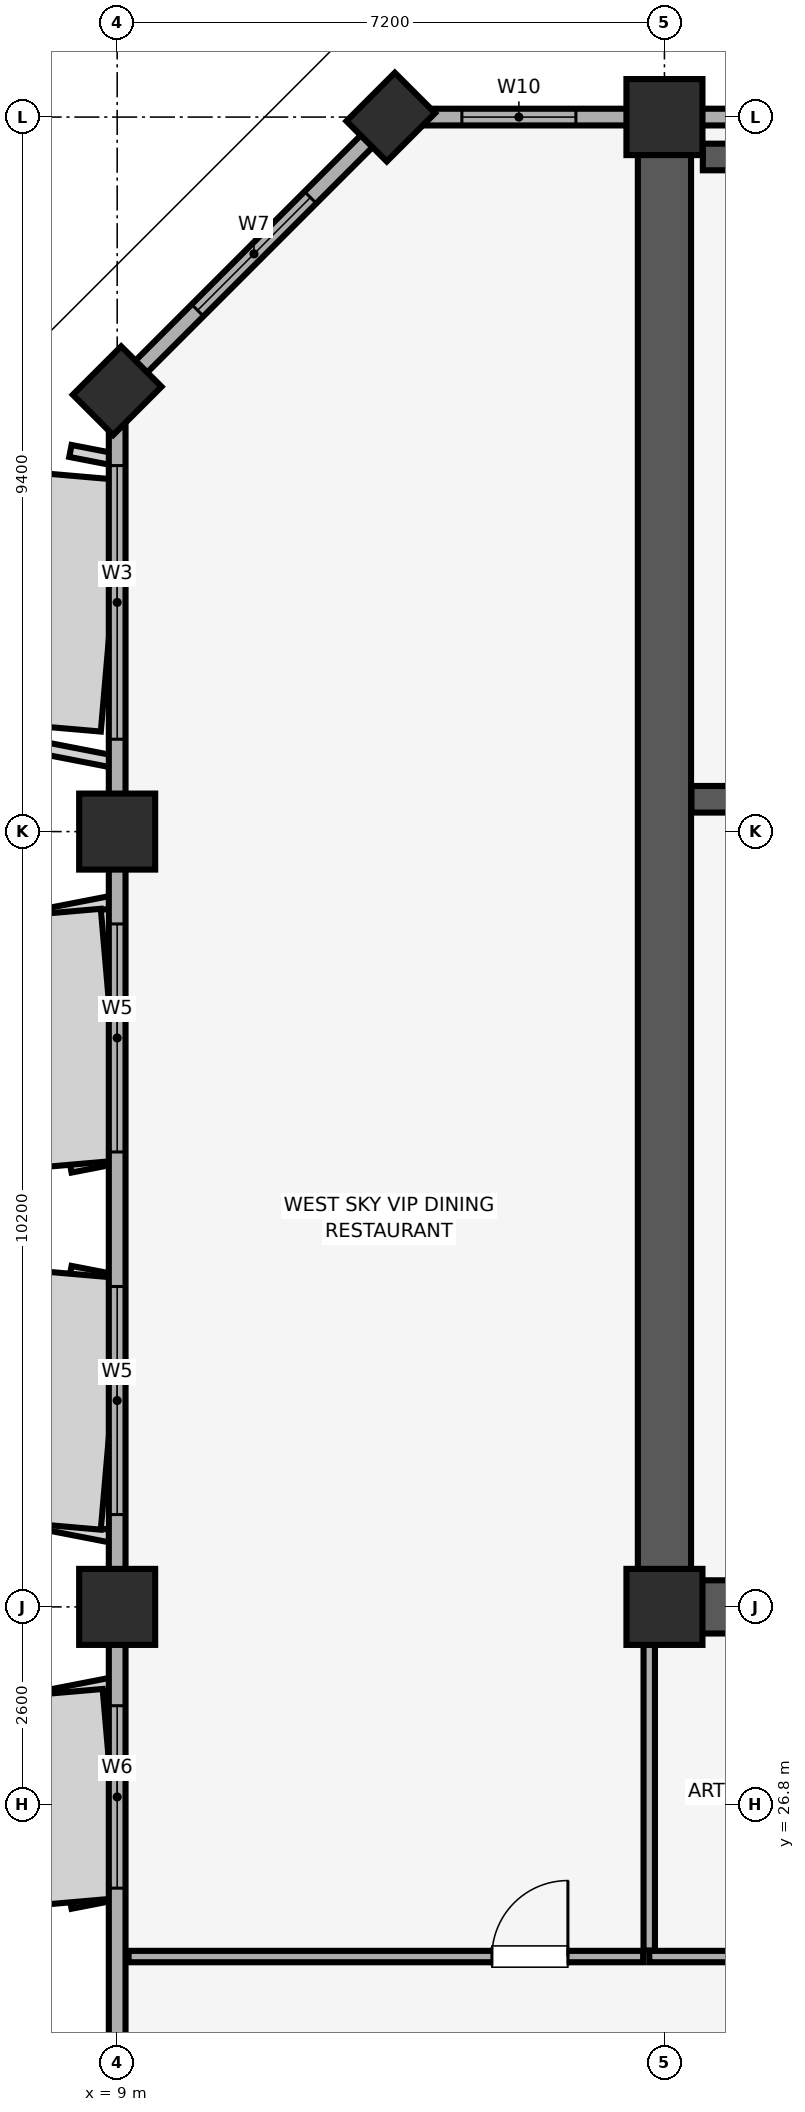
"""IFC4 building model, lengths in metres.
Left out: names, types, materials, properties, quantities, classifications, styles, units other than length and angle.
Written with IfcOpenShell. Run it as: python <this file> out.ifc"""

import sys

from ifc_helpers import new_model, si_unit, direction, frame, frame_2d, origin, origin_2d, place, context, subcontext, project, spatial, rectangle, extrude, element, fill, save


model = new_model("IFC4")
c1 = context("Model", 3, precision=1e-05, world=origin(), true_north=direction((0.0, 1.0)))
c2 = subcontext(c1, "Body", "Model", "MODEL_VIEW")
j1 = project(units=[si_unit("LENGTHUNIT", "METRE"), si_unit("PLANEANGLEUNIT", "RADIAN")], contexts=[c1])
p1 = place(None, origin())
s1 = spatial("IfcSite", under=j1, at=p1, CompositionType="ELEMENT")
p2 = place(p1, origin())
s2 = spatial("IfcBuilding", under=s1, at=p2, CompositionType="ELEMENT")
p3 = place(p2, frame((0.0, 0.0, 290.3)))
s3 = spatial("IfcBuildingStorey", under=s2, at=p3, CompositionType="ELEMENT", Elevation=290.3)
for number, where, z_axis, x_axis in (
    (1, (9.0, 29.4, 0.0), (0.0, 0.0, 1.0), (1.0, 0.0, 0.0)),
    (2, (9.0, 39.6, 0.0), (0.0, 0.0, 1.0), (1.0, 0.0, 0.0)),
):
    element("IfcColumn", number, at=place(p3, frame(where, z_axis=z_axis, x_axis=x_axis)), inside=s3, PredefinedType="COLUMN", context=c2, shape_type="SweptSolid", body=[
        extrude(rectangle(XDim=1.0, YDim=1.0, at=origin_2d()), origin(), (0.0, 0.0, 1.0), 4.02),
    ])
for number, where, z_axis, x_axis in (
    (3, (12.6, 49.0, 0.0), (0.0, 0.0, 1.0), (0.707, 0.707, 0.0)),
    (4, (9.0, 45.4, 0.0), (0.0, 0.0, 1.0), (0.707, 0.707, 0.0)),
):
    element("IfcColumn", number, at=place(p3, frame(where, z_axis=z_axis, x_axis=x_axis)), inside=s3, PredefinedType="PILASTER", context=c2, shape_type="SweptSolid", body=[
        extrude(rectangle(XDim=0.9, YDim=0.75, at=origin_2d()), origin(), (0.0, 0.0, 1.0), 4.02),
    ])
for number, where, z_axis, x_axis in (
    (5, (16.2, 29.4, 0.0), (0.0, 0.0, 1.0), (1.0, 0.0, 0.0)),
    (6, (16.2, 49.0, 0.0), (0.0, 0.0, 1.0), (1.0, 0.0, 0.0)),
):
    element("IfcColumn", number, at=place(p3, frame(where, z_axis=z_axis, x_axis=x_axis)), inside=s3, PredefinedType="COLUMN", context=c2, shape_type="SweptSolid", body=[
        extrude(rectangle(XDim=1.0, YDim=1.0, at=origin_2d()), origin(), (0.0, 0.0, 1.0), 4.02),
    ])
p4 = place(p3, frame((71.4, 49.0, 0.0), z_axis=(0.0, 0.0, 1.0), x_axis=(-1.0, 0.0, 0.0)))
e7 = element("IfcWall", 7, at=p4, inside=s3, PredefinedType="SOLIDWALL", context=c2, shape_type="SweptSolid", body=[
    extrude(rectangle(XDim=58.8, YDim=0.22, at=frame_2d((29.4, 0.0))), origin(), (0.0, 0.0, 1.0), 3.22),
])
p5 = place(p4, frame((56.365, 0.0, 0.85)))
e8 = element("IfcOpeningElement", 8, at=p5, cuts=e7, PredefinedType="OPENING", context=c2, shape_type="SweptSolid", body=[
    extrude(rectangle(XDim=1.5, YDim=1.4, at=frame_2d((0.75, 0.7))), frame((0.0, 0.12, 0.0), z_axis=(0.0, -1.0, 0.0), x_axis=(1.0, 0.0, 0.0)), (0.0, 0.0, 1.0), 0.24),
])
p6 = place(p4, frame((0.935, 0.0, 0.85)))
e9 = element("IfcOpeningElement", 9, at=p6, cuts=e7, PredefinedType="OPENING", context=c2, shape_type="SweptSolid", body=[
    extrude(rectangle(XDim=1.5, YDim=1.4, at=frame_2d((0.75, 0.7))), frame((0.0, 0.12, 0.0), z_axis=(0.0, -1.0, 0.0), x_axis=(1.0, 0.0, 0.0)), (0.0, 0.0, 1.0), 0.24),
])
p7 = place(p4, frame((41.915, 0.0, 0.9)))
e10 = element("IfcOpeningElement", 10, at=p7, cuts=e7, PredefinedType="OPENING", context=c2, shape_type="SweptSolid", body=[
    extrude(rectangle(XDim=3.6, YDim=1.5, at=frame_2d((1.8, 0.75))), frame((0.0, 0.12, 0.0), z_axis=(0.0, -1.0, 0.0), x_axis=(1.0, 0.0, 0.0)), (0.0, 0.0, 1.0), 0.24),
])
p8 = place(p4, frame((35.7, 0.0, 0.9)))
e11 = element("IfcOpeningElement", 11, at=p8, cuts=e7, PredefinedType="OPENING", context=c2, shape_type="SweptSolid", body=[
    extrude(rectangle(XDim=2.4, YDim=1.5, at=frame_2d((1.2, 0.75))), frame((0.0, 0.12, 0.0), z_axis=(0.0, -1.0, 0.0), x_axis=(1.0, 0.0, 0.0)), (0.0, 0.0, 1.0), 0.24),
])
p9 = place(p4, frame((18.95, 0.0, 0.9)))
e12 = element("IfcOpeningElement", 12, at=p9, cuts=e7, PredefinedType="OPENING", context=c2, shape_type="SweptSolid", body=[
    extrude(rectangle(XDim=3.0, YDim=1.5, at=frame_2d((1.5, 0.75))), frame((0.0, 0.12, 0.0), z_axis=(0.0, -1.0, 0.0), x_axis=(1.0, 0.0, 0.0)), (0.0, 0.0, 1.0), 0.24),
])
p10 = place(p4, frame((14.635, 0.0, 0.9)))
e13 = element("IfcOpeningElement", 13, at=p10, cuts=e7, PredefinedType="OPENING", context=c2, shape_type="SweptSolid", body=[
    extrude(rectangle(XDim=2.4, YDim=1.5, at=frame_2d((1.2, 0.75))), frame((0.0, 0.12, 0.0), z_axis=(0.0, -1.0, 0.0), x_axis=(1.0, 0.0, 0.0)), (0.0, 0.0, 1.0), 0.24),
])
p11 = place(p3, frame((12.6, 49.0, 0.0), z_axis=(0.0, 0.0, 1.0), x_axis=(-0.707106781187, -0.707106781187, 0.0)))
e14 = element("IfcWall", 14, at=p11, inside=s3, PredefinedType="SOLIDWALL", context=c2, shape_type="SweptSolid", body=[
    extrude(rectangle(XDim=5.091, YDim=0.22, at=frame_2d((2.546, 0.0))), origin(), (0.0, 0.0, 1.0), 3.22),
])
p12 = place(p11, frame((1.496, 0.0, 0.85)))
e15 = element("IfcOpeningElement", 15, at=p12, cuts=e14, PredefinedType="OPENING", context=c2, shape_type="SweptSolid", body=[
    extrude(rectangle(XDim=2.1, YDim=1.6, at=frame_2d((1.05, 0.8))), frame((0.0, 0.12, 0.0), z_axis=(0.0, -1.0, 0.0), x_axis=(1.0, 0.0, 0.0)), (0.0, 0.0, 1.0), 0.24),
])
p13 = place(p3, frame((9.0, 45.4, 0.0), z_axis=(0.0, 0.0, 1.0), x_axis=(0.0, -1.0, 0.0)))
e16 = element("IfcWall", 16, at=p13, inside=s3, PredefinedType="SOLIDWALL", context=c2, shape_type="SweptSolid", body=[
    extrude(rectangle(XDim=34.8, YDim=0.22, at=frame_2d((17.4, 0.0))), origin(), (0.0, 0.0, 1.0), 3.22),
])
p14 = place(p13, frame((31.515, 0.0, 0.85)))
e17 = element("IfcOpeningElement", 17, at=p14, cuts=e16, PredefinedType="OPENING", context=c2, shape_type="SweptSolid", body=[
    extrude(rectangle(XDim=2.4, YDim=1.5, at=frame_2d((1.2, 0.75))), frame((0.0, 0.12, 0.0), z_axis=(0.0, -1.0, 0.0), x_axis=(1.0, 0.0, 0.0)), (0.0, 0.0, 1.0), 0.24),
])
p15 = place(p13, frame((24.5, 0.0, 0.85)))
e18 = element("IfcOpeningElement", 18, at=p15, cuts=e16, PredefinedType="OPENING", context=c2, shape_type="SweptSolid", body=[
    extrude(rectangle(XDim=3.6, YDim=1.65, at=frame_2d((1.8, 0.825))), frame((0.0, 0.12, 0.0), z_axis=(0.0, -1.0, 0.0), x_axis=(1.0, 0.0, 0.0)), (0.0, 0.0, 1.0), 0.24),
])
p16 = place(p13, frame((17.3, 0.0, 0.85)))
e19 = element("IfcOpeningElement", 19, at=p16, cuts=e16, PredefinedType="OPENING", context=c2, shape_type="SweptSolid", body=[
    extrude(rectangle(XDim=2.4, YDim=1.5, at=frame_2d((1.2, 0.75))), frame((0.0, 0.12, 0.0), z_axis=(0.0, -1.0, 0.0), x_axis=(1.0, 0.0, 0.0)), (0.0, 0.0, 1.0), 0.24),
])
p17 = place(p13, frame((11.785, 0.0, 0.85)))
e20 = element("IfcOpeningElement", 20, at=p17, cuts=e16, PredefinedType="OPENING", context=c2, shape_type="SweptSolid", body=[
    extrude(rectangle(XDim=3.0, YDim=1.5, at=frame_2d((1.5, 0.75))), frame((0.0, 0.12, 0.0), z_axis=(0.0, -1.0, 0.0), x_axis=(1.0, 0.0, 0.0)), (0.0, 0.0, 1.0), 0.24),
])
p18 = place(p13, frame((7.015, 0.0, 0.85)))
e21 = element("IfcOpeningElement", 21, at=p18, cuts=e16, PredefinedType="OPENING", context=c2, shape_type="SweptSolid", body=[
    extrude(rectangle(XDim=3.0, YDim=1.5, at=frame_2d((1.5, 0.75))), frame((0.0, 0.12, 0.0), z_axis=(0.0, -1.0, 0.0), x_axis=(1.0, 0.0, 0.0)), (0.0, 0.0, 1.0), 0.24),
])
p19 = place(p13, frame((0.985, 0.0, 0.85)))
e22 = element("IfcOpeningElement", 22, at=p19, cuts=e16, PredefinedType="OPENING", context=c2, shape_type="SweptSolid", body=[
    extrude(rectangle(XDim=3.6, YDim=1.65, at=frame_2d((1.8, 0.825))), frame((0.0, 0.12, 0.0), z_axis=(0.0, -1.0, 0.0), x_axis=(1.0, 0.0, 0.0)), (0.0, 0.0, 1.0), 0.24),
])
p20 = place(p3, frame((16.2, 29.4, 0.0), z_axis=(0.0, 0.0, 1.0), x_axis=(0.0, 1.0, 0.0)))
e23 = element("IfcWall", 23, at=p20, inside=s3, PredefinedType="SHEAR", context=c2, shape_type="SweptSolid", body=[
    extrude(rectangle(XDim=19.2, YDim=0.7, at=frame_2d((9.6, 0.0))), origin(), (0.0, 0.0, 1.0), 4.02),
])
p21 = place(p3, frame((16.555, 29.4, 0.0), z_axis=(0.0, 0.0, 1.0), x_axis=(1.0, 0.0, 0.0)))
e24 = element("IfcWall", 24, at=p21, inside=s3, PredefinedType="SHEAR", context=c2, shape_type="SweptSolid", body=[
    extrude(rectangle(XDim=7.045, YDim=0.7, at=frame_2d((3.522, 0.0))), origin(), (0.0, 0.0, 1.0), 4.02),
])
p22 = place(p3, frame((16.555, 40.025, 0.0), z_axis=(0.0, 0.0, 1.0), x_axis=(1.0, 0.0, 0.0)))
e25 = element("IfcWall", 25, at=p22, inside=s3, PredefinedType="SHEAR", context=c2, shape_type="SweptSolid", body=[
    extrude(rectangle(XDim=4.3, YDim=0.35, at=frame_2d((2.15, 0.0))), origin(), (0.0, 0.0, 1.0), 4.02),
])
p23 = place(p22, frame((1.91, 0.0, 0.0)))
e26 = element("IfcOpeningElement", 26, at=p23, cuts=e25, PredefinedType="OPENING", context=c2, shape_type="SweptSolid", body=[
    extrude(rectangle(XDim=1.15, YDim=2.15, at=frame_2d((0.575, 1.075))), frame((0.0, 0.185, 0.0), z_axis=(0.0, -1.0, 0.0), x_axis=(1.0, 0.0, 0.0)), (0.0, 0.0, 1.0), 0.37),
])
p24 = place(p3, frame((16.705, 48.475, 0.0), z_axis=(0.0, 0.0, 1.0), x_axis=(1.0, 0.0, 0.0)))
e27 = element("IfcWall", 27, at=p24, inside=s3, PredefinedType="SHEAR", context=c2, shape_type="SweptSolid", body=[
    extrude(rectangle(XDim=4.15, YDim=0.35, at=frame_2d((2.075, 0.0))), origin(), (0.0, 0.0, 1.0), 4.02),
])
p25 = place(p3, frame((16.0, 24.8, 0.0), z_axis=(0.0, 0.0, 1.0), x_axis=(1.0, 0.0, 0.0)))
e28 = element("IfcWall", 28, at=p25, inside=s3, PredefinedType="PARTITIONING", context=c2, shape_type="SweptSolid", body=[
    extrude(rectangle(XDim=9.0, YDim=0.15, at=frame_2d((4.5, 0.0))), origin(), (0.0, 0.0, 1.0), 4.02),
])
p26 = place(p25, frame((4.0, 0.0, 0.0)))
e29 = element("IfcOpeningElement", 29, at=p26, cuts=e28, PredefinedType="OPENING", context=c2, shape_type="SweptSolid", body=[
    extrude(rectangle(XDim=1.0, YDim=2.15, at=frame_2d((0.5, 1.075))), frame((0.0, 0.085, 0.0), z_axis=(0.0, -1.0, 0.0), x_axis=(1.0, 0.0, 0.0)), (0.0, 0.0, 1.0), 0.17),
])
p27 = place(p3, frame((16.0, 24.88, 0.0), z_axis=(0.0, 0.0, 1.0), x_axis=(0.0, 1.0, 0.0)))
e30 = element("IfcWall", 30, at=p27, inside=s3, PredefinedType="PARTITIONING", context=c2, shape_type="SweptSolid", body=[
    extrude(rectangle(XDim=4.51, YDim=0.15, at=frame_2d((2.255, 0.0))), origin(), (0.0, 0.0, 1.0), 3.66),
])
p28 = place(p3, frame((9.15, 24.8, 0.0), z_axis=(0.0, 0.0, 1.0), x_axis=(1.0, 0.0, 0.0)))
e31 = element("IfcWall", 31, at=p28, inside=s3, PredefinedType="PARTITIONING", context=c2, shape_type="SweptSolid", body=[
    extrude(rectangle(XDim=6.77, YDim=0.15, at=frame_2d((3.385, 0.0))), origin(), (0.0, 0.0, 1.0), 4.02),
])
p29 = place(p28, frame((4.78, 0.0, 0.0)))
e32 = element("IfcOpeningElement", 32, at=p29, cuts=e31, PredefinedType="OPENING", context=c2, shape_type="SweptSolid", body=[
    extrude(rectangle(XDim=1.0, YDim=2.15, at=frame_2d((0.5, 1.075))), frame((0.0, 0.085, 0.0), z_axis=(0.0, -1.0, 0.0), x_axis=(1.0, 0.0, 0.0)), (0.0, 0.0, 1.0), 0.17),
])
p30 = place(p12, origin())
e33 = element("IfcWindow", 33, at=p30, inside=s3, PartitioningType="SINGLE_PANEL", PredefinedType="WINDOW", context=c2, shape_type="SweptSolid", body=[
    extrude(rectangle(XDim=2.1, YDim=1.6, at=frame_2d((1.05, 0.8))), frame((0.0, 0.03, 0.0), z_axis=(0.0, -1.0, 0.0), x_axis=(1.0, 0.0, 0.0)), (0.0, 0.0, 1.0), 0.06),
])
fill(e15, e33)
p31 = place(p16, origin())
e34 = element("IfcWindow", 34, at=p31, inside=s3, PartitioningType="SINGLE_PANEL", PredefinedType="WINDOW", context=c2, shape_type="SweptSolid", body=[
    extrude(rectangle(XDim=2.4, YDim=1.5, at=frame_2d((1.2, 0.75))), frame((0.0, 0.03, 0.0), z_axis=(0.0, -1.0, 0.0), x_axis=(1.0, 0.0, 0.0)), (0.0, 0.0, 1.0), 0.06),
])
fill(e19, e34)
p32 = place(p17, origin())
e35 = element("IfcWindow", 35, at=p32, inside=s3, PartitioningType="SINGLE_PANEL", PredefinedType="WINDOW", context=c2, shape_type="SweptSolid", body=[
    extrude(rectangle(XDim=3.0, YDim=1.5, at=frame_2d((1.5, 0.75))), frame((0.0, 0.03, 0.0), z_axis=(0.0, -1.0, 0.0), x_axis=(1.0, 0.0, 0.0)), (0.0, 0.0, 1.0), 0.06),
])
fill(e20, e35)
p33 = place(p18, origin())
e36 = element("IfcWindow", 36, at=p33, inside=s3, PartitioningType="SINGLE_PANEL", PredefinedType="WINDOW", context=c2, shape_type="SweptSolid", body=[
    extrude(rectangle(XDim=3.0, YDim=1.5, at=frame_2d((1.5, 0.75))), frame((0.0, 0.03, 0.0), z_axis=(0.0, -1.0, 0.0), x_axis=(1.0, 0.0, 0.0)), (0.0, 0.0, 1.0), 0.06),
])
fill(e21, e36)
p34 = place(p19, origin())
e37 = element("IfcWindow", 37, at=p34, inside=s3, PartitioningType="SINGLE_PANEL", PredefinedType="WINDOW", context=c2, shape_type="SweptSolid", body=[
    extrude(rectangle(XDim=3.6, YDim=1.65, at=frame_2d((1.8, 0.825))), frame((0.0, 0.03, 0.0), z_axis=(0.0, -1.0, 0.0), x_axis=(1.0, 0.0, 0.0)), (0.0, 0.0, 1.0), 0.06),
])
fill(e22, e37)
p35 = place(p5, origin())
e38 = element("IfcWindow", 38, at=p35, inside=s3, PartitioningType="SINGLE_PANEL", PredefinedType="WINDOW", context=c2, shape_type="SweptSolid", body=[
    extrude(rectangle(XDim=1.5, YDim=1.4, at=frame_2d((0.75, 0.7))), frame((0.0, 0.03, 0.0), z_axis=(0.0, -1.0, 0.0), x_axis=(1.0, 0.0, 0.0)), (0.0, 0.0, 1.0), 0.06),
])
fill(e8, e38)
p36 = place(p29, origin())
e39 = element("IfcDoor", 39, at=p36, inside=s3, OperationType="SINGLE_SWING_RIGHT", PredefinedType="DOOR", context=c2, shape_type="SweptSolid", body=[
    extrude(rectangle(XDim=1.0, YDim=2.15, at=frame_2d((0.5, 1.075))), frame((0.0, 0.025, 0.0), z_axis=(0.0, -1.0, 0.0), x_axis=(1.0, 0.0, 0.0)), (0.0, 0.0, 1.0), 0.05),
])
fill(e32, e39)
save(model, sys.argv[1])
